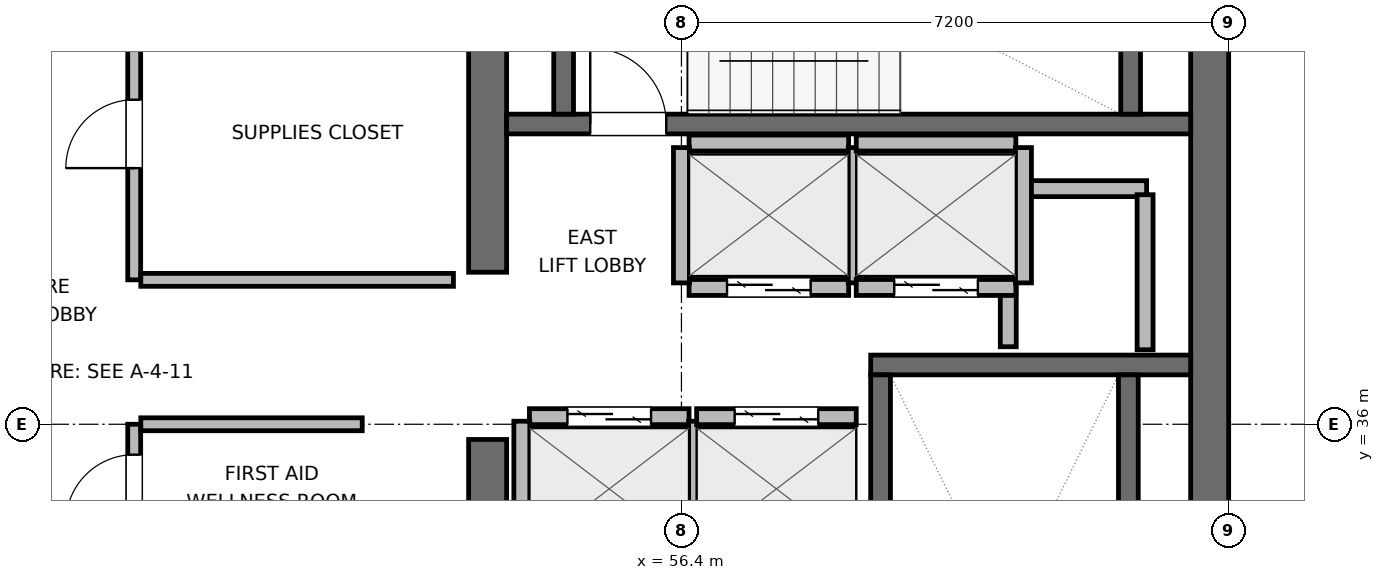
"""IFC4 building model, lengths in metres.
Left out: names, types, materials, properties, quantities, classifications, styles, units other than length and angle.
Written with IfcOpenShell. Run it as: python <this file> out.ifc"""

import sys

from ifc_helpers import new_model, si_unit, direction, frame, frame_2d, origin, place, context, subcontext, project, spatial, rectangle, extrude, element, fill, save


model = new_model("IFC4")
c1 = context("Model", 3, precision=1e-05, world=origin(), true_north=direction((0.0, 1.0)))
c2 = subcontext(c1, "Body", "Model", "MODEL_VIEW")
j1 = project(units=[si_unit("LENGTHUNIT", "METRE"), si_unit("PLANEANGLEUNIT", "RADIAN")], contexts=[c1])
p1 = place(None, origin())
s1 = spatial("IfcSite", under=j1, at=p1, CompositionType="ELEMENT")
p2 = place(p1, origin())
s2 = spatial("IfcBuilding", under=s1, at=p2, CompositionType="ELEMENT")
p3 = place(p2, frame((0.0, 0.0, 346.5)))
s3 = spatial("IfcBuildingStorey", under=s2, at=p3, CompositionType="ELEMENT", Elevation=346.5)
p4 = place(p3, frame((53.85, 27.85, 0.0), z_axis=(0.0, 0.0, 1.0), x_axis=(0.0, 1.0, 0.0)))
e1 = element("IfcWall", 1, at=p4, inside=s3, PredefinedType="SHEAR", context=c2, shape_type="SweptSolid", body=[
    extrude(rectangle(XDim=7.95, YDim=0.5, at=frame_2d((3.975, 0.0))), origin(), (0.0, 0.0, 1.0), 3.9),
])
p5 = place(p3, frame((53.85, 38.0, 0.0), z_axis=(0.0, 0.0, 1.0), x_axis=(0.0, 1.0, 0.0)))
e2 = element("IfcWall", 2, at=p5, inside=s3, PredefinedType="SHEAR", context=c2, shape_type="SweptSolid", body=[
    extrude(rectangle(XDim=6.15, YDim=0.5, at=frame_2d((3.075, 0.0))), origin(), (0.0, 0.0, 1.0), 3.9),
])
p6 = place(p3, frame((63.35, 27.6, 0.0), z_axis=(0.0, 0.0, 1.0), x_axis=(0.0, 1.0, 0.0)))
e3 = element("IfcWall", 3, at=p6, inside=s3, PredefinedType="SHEAR", context=c2, shape_type="SweptSolid", body=[
    extrude(rectangle(XDim=16.8, YDim=0.5, at=frame_2d((8.4, 0.0))), origin(), (0.0, 0.0, 1.0), 3.9),
])
p7 = place(p3, frame((58.89, 36.78, 0.0), z_axis=(0.0, 0.0, 1.0), x_axis=(1.0, 0.0, 0.0)))
e4 = element("IfcWall", 4, at=p7, inside=s3, PredefinedType="SHEAR", context=c2, shape_type="SweptSolid", body=[
    extrude(rectangle(XDim=4.21, YDim=0.26, at=frame_2d((2.105, 0.0))), origin(), (0.0, 0.0, 1.0), 3.9),
])
p8 = place(p3, frame((59.02, 29.05, 0.0), z_axis=(0.0, 0.0, 1.0), x_axis=(0.0, 1.0, 0.0)))
e5 = element("IfcWall", 5, at=p8, inside=s3, PredefinedType="SHEAR", context=c2, shape_type="SweptSolid", body=[
    extrude(rectangle(XDim=7.6, YDim=0.26, at=frame_2d((3.8, 0.0))), origin(), (0.0, 0.0, 1.0), 3.9),
])
p9 = place(p8, frame((0.3, 0.0, 0.0)))
e6 = element("IfcOpeningElement", 6, at=p9, cuts=e5, PredefinedType="OPENING", context=c2, shape_type="SweptSolid", body=[
    extrude(rectangle(XDim=1.0, YDim=2.04, at=frame_2d((0.5, 1.02))), frame((0.0, 0.14, 0.0), z_axis=(0.0, -1.0, 0.0), x_axis=(1.0, 0.0, 0.0)), (0.0, 0.0, 1.0), 0.28),
])
p10 = place(p3, frame((62.28, 29.05, 0.0), z_axis=(0.0, 0.0, 1.0), x_axis=(0.0, 1.0, 0.0)))
e7 = element("IfcWall", 7, at=p10, inside=s3, PredefinedType="SHEAR", context=c2, shape_type="SweptSolid", body=[
    extrude(rectangle(XDim=7.6, YDim=0.26, at=frame_2d((3.8, 0.0))), origin(), (0.0, 0.0, 1.0), 3.9),
])
p11 = place(p3, frame((54.1, 39.95, 0.0), z_axis=(0.0, 0.0, 1.0), x_axis=(1.0, 0.0, 0.0)))
e8 = element("IfcWall", 8, at=p11, inside=s3, PredefinedType="SHEAR", context=c2, shape_type="SweptSolid", body=[
    extrude(rectangle(XDim=9.0, YDim=0.26, at=frame_2d((4.5, 0.0))), origin(), (0.0, 0.0, 1.0), 3.9),
])
p12 = place(p11, frame((1.1, 0.0, 0.0)))
e9 = element("IfcOpeningElement", 9, at=p12, cuts=e8, PredefinedType="OPENING", context=c2, shape_type="SweptSolid", body=[
    extrude(rectangle(XDim=1.0, YDim=2.04, at=frame_2d((0.5, 1.02))), frame((0.0, 0.14, 0.0), z_axis=(0.0, -1.0, 0.0), x_axis=(1.0, 0.0, 0.0)), (0.0, 0.0, 1.0), 0.28),
])
for number, where, z_axis, x_axis in (
    (10, (54.85, 40.08, 0.0), (0.0, 0.0, 1.0), (0.0, 1.0, 0.0)),
    (11, (62.31, 40.08, 0.0), (0.0, 0.0, 1.0), (0.0, 1.0, 0.0)),
):
    element("IfcWall", number, at=place(p3, frame(where, z_axis=z_axis, x_axis=x_axis)), inside=s3, PredefinedType="SHEAR", context=c2, shape_type="SweptSolid", body=[
        extrude(rectangle(XDim=2.94, YDim=0.26, at=frame_2d((1.47, 0.0))), origin(), (0.0, 0.0, 1.0), 3.9),
    ])
p13 = place(p3, frame((60.72, 39.1, 0.0), z_axis=(0.0, 0.0, 1.0), x_axis=(1.0, 0.0, 0.0)))
e12 = element("IfcWall", 12, at=p13, inside=s3, PredefinedType="PARTITIONING", context=c2, shape_type="SweptSolid", body=[
    extrude(rectangle(XDim=1.8, YDim=0.21, at=frame_2d((0.9, 0.0))), origin(), (0.0, 0.0, 1.0), 3.68),
])
p14 = place(p3, frame((60.7, 37.02, 0.0), z_axis=(0.0, 0.0, 1.0), x_axis=(0.0, 1.0, 0.0)))
e13 = element("IfcWall", 13, at=p14, inside=s3, PredefinedType="PARTITIONING", context=c2, shape_type="SweptSolid", body=[
    extrude(rectangle(XDim=1.96, YDim=0.21, at=frame_2d((0.98, 0.0))), origin(), (0.0, 0.0, 1.0), 3.68),
])
p15 = place(p3, frame((62.5, 36.98, 0.0), z_axis=(0.0, 0.0, 1.0), x_axis=(0.0, 1.0, 0.0)))
e14 = element("IfcWall", 14, at=p15, inside=s3, PredefinedType="PARTITIONING", context=c2, shape_type="SweptSolid", body=[
    extrude(rectangle(XDim=2.04, YDim=0.21, at=frame_2d((1.02, 0.0))), origin(), (0.0, 0.0, 1.0), 3.68),
])
p16 = place(p3, frame((54.4, 36.1, 0.0), z_axis=(0.0, 0.0, 1.0), x_axis=(1.0, 0.0, 0.0)))
e15 = element("IfcWall", 15, at=p16, inside=s3, PredefinedType="PARTITIONING", context=c2, shape_type="SweptSolid", body=[
    extrude(rectangle(XDim=2.1, YDim=0.21, at=frame_2d((1.05, 0.0))), origin(), (0.0, 0.0, 1.0), 3.68),
])
p17 = place(p16, frame((0.5, 0.0, 0.0)))
e16 = element("IfcOpeningElement", 16, at=p17, cuts=e15, PredefinedType="OPENING", context=c2, shape_type="SweptSolid", body=[
    extrude(rectangle(XDim=1.1, YDim=2.04, at=frame_2d((0.55, 1.02))), frame((0.0, 0.115, 0.0), z_axis=(0.0, -1.0, 0.0), x_axis=(1.0, 0.0, 0.0)), (0.0, 0.0, 1.0), 0.23),
])
for number, where, z_axis, x_axis in (
    (17, (54.3, 34.26, 0.0), (0.0, 0.0, 1.0), (0.0, 1.0, 0.0)),
    (18, (56.6, 34.26, 0.0), (0.0, 0.0, 1.0), (0.0, 1.0, 0.0)),
):
    element("IfcWall", number, at=place(p3, frame(where, z_axis=z_axis, x_axis=x_axis)), inside=s3, PredefinedType="PARTITIONING", context=c2, shape_type="SweptSolid", body=[
        extrude(rectangle(XDim=1.78, YDim=0.21, at=frame_2d((0.89, 0.0))), origin(), (0.0, 0.0, 1.0), 3.68),
    ])
p18 = place(p3, frame((56.6, 36.1, 0.0), z_axis=(0.0, 0.0, 1.0), x_axis=(1.0, 0.0, 0.0)))
e19 = element("IfcWall", 19, at=p18, inside=s3, PredefinedType="PARTITIONING", context=c2, shape_type="SweptSolid", body=[
    extrude(rectangle(XDim=2.1, YDim=0.21, at=frame_2d((1.05, 0.0))), origin(), (0.0, 0.0, 1.0), 3.68),
])
p19 = place(p18, frame((0.5, 0.0, 0.0)))
e20 = element("IfcOpeningElement", 20, at=p19, cuts=e19, PredefinedType="OPENING", context=c2, shape_type="SweptSolid", body=[
    extrude(rectangle(XDim=1.1, YDim=2.04, at=frame_2d((0.55, 1.02))), frame((0.0, 0.115, 0.0), z_axis=(0.0, -1.0, 0.0), x_axis=(1.0, 0.0, 0.0)), (0.0, 0.0, 1.0), 0.23),
])
p20 = place(p3, frame((56.5, 37.8, 0.0), z_axis=(0.0, 0.0, 1.0), x_axis=(1.0, 0.0, 0.0)))
e21 = element("IfcWall", 21, at=p20, inside=s3, PredefinedType="PARTITIONING", context=c2, shape_type="SweptSolid", body=[
    extrude(rectangle(XDim=2.1, YDim=0.21, at=frame_2d((1.05, 0.0))), origin(), (0.0, 0.0, 1.0), 3.68),
])
p21 = place(p20, frame((0.5, 0.0, 0.0)))
e22 = element("IfcOpeningElement", 22, at=p21, cuts=e21, PredefinedType="OPENING", context=c2, shape_type="SweptSolid", body=[
    extrude(rectangle(XDim=1.1, YDim=2.04, at=frame_2d((0.55, 1.02))), frame((0.0, 0.115, 0.0), z_axis=(0.0, -1.0, 0.0), x_axis=(1.0, 0.0, 0.0)), (0.0, 0.0, 1.0), 0.23),
])
p22 = place(p3, frame((56.5, 39.7, 0.0), z_axis=(0.0, 0.0, 1.0), x_axis=(1.0, 0.0, 0.0)))
e23 = element("IfcWall", 23, at=p22, inside=s3, PredefinedType="PARTITIONING", context=c2, shape_type="SweptSolid", body=[
    extrude(rectangle(XDim=2.1, YDim=0.21, at=frame_2d((1.05, 0.0))), origin(), (0.0, 0.0, 1.0), 3.68),
])
for number, where, z_axis, x_axis in (
    (24, (56.4, 37.86, 0.0), (0.0, 0.0, 1.0), (0.0, 1.0, 0.0)),
    (25, (58.7, 37.86, 0.0), (0.0, 0.0, 1.0), (0.0, 1.0, 0.0)),
):
    element("IfcWall", number, at=place(p3, frame(where, z_axis=z_axis, x_axis=x_axis)), inside=s3, PredefinedType="PARTITIONING", context=c2, shape_type="SweptSolid", body=[
        extrude(rectangle(XDim=1.78, YDim=0.21, at=frame_2d((0.89, 0.0))), origin(), (0.0, 0.0, 1.0), 3.68),
    ])
p23 = place(p3, frame((58.7, 37.8, 0.0), z_axis=(0.0, 0.0, 1.0), x_axis=(1.0, 0.0, 0.0)))
e26 = element("IfcWall", 26, at=p23, inside=s3, PredefinedType="PARTITIONING", context=c2, shape_type="SweptSolid", body=[
    extrude(rectangle(XDim=2.1, YDim=0.21, at=frame_2d((1.05, 0.0))), origin(), (0.0, 0.0, 1.0), 3.68),
])
p24 = place(p23, frame((0.5, 0.0, 0.0)))
e27 = element("IfcOpeningElement", 27, at=p24, cuts=e26, PredefinedType="OPENING", context=c2, shape_type="SweptSolid", body=[
    extrude(rectangle(XDim=1.1, YDim=2.04, at=frame_2d((0.55, 1.02))), frame((0.0, 0.115, 0.0), z_axis=(0.0, -1.0, 0.0), x_axis=(1.0, 0.0, 0.0)), (0.0, 0.0, 1.0), 0.23),
])
p25 = place(p3, frame((58.7, 39.7, 0.0), z_axis=(0.0, 0.0, 1.0), x_axis=(1.0, 0.0, 0.0)))
e28 = element("IfcWall", 28, at=p25, inside=s3, PredefinedType="PARTITIONING", context=c2, shape_type="SweptSolid", body=[
    extrude(rectangle(XDim=2.1, YDim=0.21, at=frame_2d((1.05, 0.0))), origin(), (0.0, 0.0, 1.0), 3.68),
])
p26 = place(p3, frame((60.9, 37.86, 0.0), z_axis=(0.0, 0.0, 1.0), x_axis=(0.0, 1.0, 0.0)))
e29 = element("IfcWall", 29, at=p26, inside=s3, PredefinedType="PARTITIONING", context=c2, shape_type="SweptSolid", body=[
    extrude(rectangle(XDim=1.78, YDim=0.21, at=frame_2d((0.89, 0.0))), origin(), (0.0, 0.0, 1.0), 3.68),
])
p27 = place(p3, frame((49.2, 32.6, 0.0), z_axis=(0.0, 0.0, 1.0), x_axis=(0.0, 1.0, 0.0)))
e30 = element("IfcWall", 30, at=p27, inside=s3, PredefinedType="PARTITIONING", context=c2, shape_type="SweptSolid", body=[
    extrude(rectangle(XDim=3.4, YDim=0.17, at=frame_2d((1.7, 0.0))), origin(), (0.0, 0.0, 1.0), 3.68),
])
p28 = place(p27, frame((0.4, 0.0, 0.0)))
e31 = element("IfcOpeningElement", 31, at=p28, cuts=e30, PredefinedType="OPENING", context=c2, shape_type="SweptSolid", body=[
    extrude(rectangle(XDim=0.9, YDim=2.02, at=frame_2d((0.45, 1.01))), frame((0.0, 0.095, 0.0), z_axis=(0.0, -1.0, 0.0), x_axis=(1.0, 0.0, 0.0)), (0.0, 0.0, 1.0), 0.19),
])
p29 = place(p27, frame((2.1, 0.0, 0.0)))
e32 = element("IfcOpeningElement", 32, at=p29, cuts=e30, PredefinedType="OPENING", context=c2, shape_type="SweptSolid", body=[
    extrude(rectangle(XDim=0.9, YDim=2.02, at=frame_2d((0.45, 1.01))), frame((0.0, 0.095, 0.0), z_axis=(0.0, -1.0, 0.0), x_axis=(1.0, 0.0, 0.0)), (0.0, 0.0, 1.0), 0.19),
])
p30 = place(p3, frame((49.287, 36.0, 0.0), z_axis=(0.0, 0.0, 1.0), x_axis=(1.0, 0.0, 0.0)))
e33 = element("IfcWall", 33, at=p30, inside=s3, PredefinedType="PARTITIONING", context=c2, shape_type="SweptSolid", body=[
    extrude(rectangle(XDim=2.913, YDim=0.17, at=frame_2d((1.457, 0.0))), origin(), (0.0, 0.0, 1.0), 3.68),
])
p31 = place(p3, frame((49.2, 37.9, 0.0), z_axis=(0.0, 0.0, 1.0), x_axis=(0.0, 1.0, 0.0)))
e34 = element("IfcWall", 34, at=p31, inside=s3, PredefinedType="PARTITIONING", context=c2, shape_type="SweptSolid", body=[
    extrude(rectangle(XDim=6.0, YDim=0.17, at=frame_2d((3.0, 0.0))), origin(), (0.0, 0.0, 1.0), 3.68),
])
p32 = place(p31, frame((1.47, 0.0, 0.0)))
e35 = element("IfcOpeningElement", 35, at=p32, cuts=e34, PredefinedType="OPENING", context=c2, shape_type="SweptSolid", body=[
    extrude(rectangle(XDim=0.9, YDim=2.02, at=frame_2d((0.45, 1.01))), frame((0.0, 0.095, 0.0), z_axis=(0.0, -1.0, 0.0), x_axis=(1.0, 0.0, 0.0)), (0.0, 0.0, 1.0), 0.19),
])
p33 = place(p31, frame((4.47, 0.0, 0.0)))
e36 = element("IfcOpeningElement", 36, at=p33, cuts=e34, PredefinedType="OPENING", context=c2, shape_type="SweptSolid", body=[
    extrude(rectangle(XDim=0.9, YDim=2.02, at=frame_2d((0.45, 1.01))), frame((0.0, 0.095, 0.0), z_axis=(0.0, -1.0, 0.0), x_axis=(1.0, 0.0, 0.0)), (0.0, 0.0, 1.0), 0.19),
])
p34 = place(p3, frame((49.287, 37.9, 0.0), z_axis=(0.0, 0.0, 1.0), x_axis=(1.0, 0.0, 0.0)))
e37 = element("IfcWall", 37, at=p34, inside=s3, PredefinedType="PARTITIONING", context=c2, shape_type="SweptSolid", body=[
    extrude(rectangle(XDim=4.113, YDim=0.17, at=frame_2d((2.056, 0.0))), origin(), (0.0, 0.0, 1.0), 3.68),
])
p35 = place(p12, origin())
e38 = element("IfcDoor", 38, at=p35, inside=s3, OperationType="SINGLE_SWING_LEFT", PredefinedType="DOOR", context=c2, shape_type="SweptSolid", body=[
    extrude(rectangle(XDim=1.0, YDim=2.04, at=frame_2d((0.5, 1.02))), frame((0.0, 0.025, 0.0), z_axis=(0.0, -1.0, 0.0), x_axis=(1.0, 0.0, 0.0)), (0.0, 0.0, 1.0), 0.05),
])
fill(e9, e38)
p36 = place(p17, origin())
e39 = element("IfcDoor", 39, at=p36, inside=s3, OperationType="DOUBLE_DOOR_SLIDING", PredefinedType="DOOR", context=c2, shape_type="SweptSolid", body=[
    extrude(rectangle(XDim=1.1, YDim=2.04, at=frame_2d((0.55, 1.02))), frame((0.0, 0.025, 0.0), z_axis=(0.0, -1.0, 0.0), x_axis=(1.0, 0.0, 0.0)), (0.0, 0.0, 1.0), 0.05),
])
fill(e16, e39)
p37 = place(p19, origin())
e40 = element("IfcDoor", 40, at=p37, inside=s3, OperationType="DOUBLE_DOOR_SLIDING", PredefinedType="DOOR", context=c2, shape_type="SweptSolid", body=[
    extrude(rectangle(XDim=1.1, YDim=2.04, at=frame_2d((0.55, 1.02))), frame((0.0, 0.025, 0.0), z_axis=(0.0, -1.0, 0.0), x_axis=(1.0, 0.0, 0.0)), (0.0, 0.0, 1.0), 0.05),
])
fill(e20, e40)
p38 = place(p21, origin())
e41 = element("IfcDoor", 41, at=p38, inside=s3, OperationType="DOUBLE_DOOR_SLIDING", PredefinedType="DOOR", context=c2, shape_type="SweptSolid", body=[
    extrude(rectangle(XDim=1.1, YDim=2.04, at=frame_2d((0.55, 1.02))), frame((0.0, 0.025, 0.0), z_axis=(0.0, -1.0, 0.0), x_axis=(1.0, 0.0, 0.0)), (0.0, 0.0, 1.0), 0.05),
])
fill(e22, e41)
p39 = place(p24, origin())
e42 = element("IfcDoor", 42, at=p39, inside=s3, OperationType="DOUBLE_DOOR_SLIDING", PredefinedType="DOOR", context=c2, shape_type="SweptSolid", body=[
    extrude(rectangle(XDim=1.1, YDim=2.04, at=frame_2d((0.55, 1.02))), frame((0.0, 0.025, 0.0), z_axis=(0.0, -1.0, 0.0), x_axis=(1.0, 0.0, 0.0)), (0.0, 0.0, 1.0), 0.05),
])
fill(e27, e42)
p40 = place(p29, origin())
e43 = element("IfcDoor", 43, at=p40, inside=s3, OperationType="SINGLE_SWING_LEFT", PredefinedType="DOOR", context=c2, shape_type="SweptSolid", body=[
    extrude(rectangle(XDim=0.9, YDim=2.02, at=frame_2d((0.45, 1.01))), frame((0.0, 0.025, 0.0), z_axis=(0.0, -1.0, 0.0), x_axis=(1.0, 0.0, 0.0)), (0.0, 0.0, 1.0), 0.05),
])
fill(e32, e43)
p41 = place(p32, origin())
e44 = element("IfcDoor", 44, at=p41, inside=s3, OperationType="SINGLE_SWING_LEFT", PredefinedType="DOOR", context=c2, shape_type="SweptSolid", body=[
    extrude(rectangle(XDim=0.9, YDim=2.02, at=frame_2d((0.45, 1.01))), frame((0.0, 0.025, 0.0), z_axis=(0.0, -1.0, 0.0), x_axis=(1.0, 0.0, 0.0)), (0.0, 0.0, 1.0), 0.05),
])
fill(e35, e44)
save(model, sys.argv[1])
